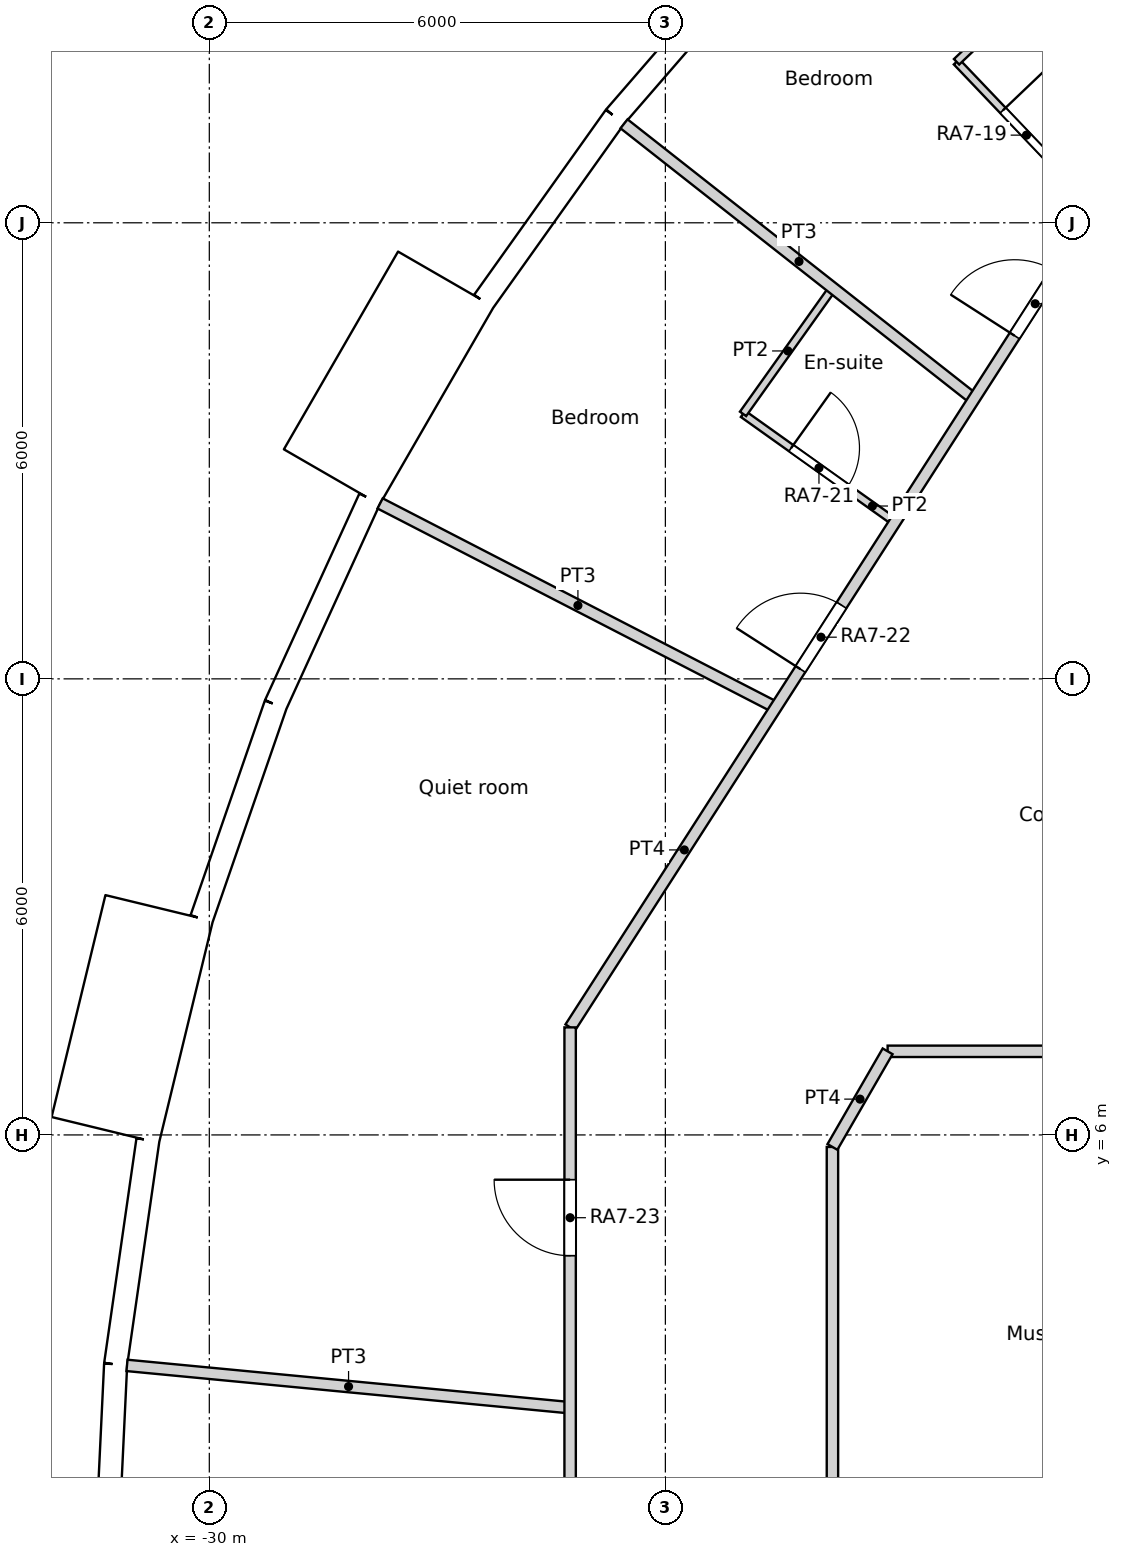
"""IFC4 building model, lengths in metres.
Left out: names, types, materials, properties, quantities, classifications, styles, units other than length and angle.
Written with IfcOpenShell. Run it as: python <this file> out.ifc"""

import sys

from ifc_helpers import new_model, si_unit, direction, frame, frame_2d, origin, origin_2d, place, context, subcontext, project, spatial, rectangle, circle, extrude, element, fill, save


model = new_model("IFC4")
c1 = context("Model", 3, precision=1e-05, world=origin(), true_north=direction((0.0, 1.0)))
c2 = subcontext(c1, "Body", "Model", "MODEL_VIEW")
j1 = project(units=[si_unit("LENGTHUNIT", "METRE"), si_unit("PLANEANGLEUNIT", "RADIAN")], contexts=[c1])
p1 = place(None, origin())
s1 = spatial("IfcSite", under=j1, at=p1, CompositionType="ELEMENT")
p2 = place(p1, origin())
s2 = spatial("IfcBuilding", under=s1, at=p2, CompositionType="ELEMENT")
p3 = place(p2, frame((0.0, 0.0, 93.0)))
s3 = spatial("IfcBuildingStorey", under=s2, at=p3, CompositionType="ELEMENT", Elevation=93.0)
for number, where, z_axis, x_axis in (
    (1, (-23.797, 18.715, 0.0), (0.0, 0.0, 1.0), (1.0, 0.0, 0.0)),
    (2, (-26.909, 13.873, 0.0), (0.0, 0.0, 1.0), (1.0, 0.0, 0.0)),
    (3, (-29.048, 8.529, 0.0), (0.0, 0.0, 1.0), (1.0, 0.0, 0.0)),
    (4, (-30.137, 2.878, 0.0), (0.0, 0.0, 1.0), (1.0, 0.0, 0.0)),
):
    element("IfcColumn", number, at=place(p3, frame(where, z_axis=z_axis, x_axis=x_axis)), inside=s3, PredefinedType="COLUMN", context=c2, shape_type="SweptSolid", body=[
        extrude(circle(Radius=0.6, at=origin_2d()), origin(), (0.0, 0.0, 1.0), 3.6),
    ])
for number, where, z_axis, x_axis in (
    (5, (-20.509, 13.489, 0.0), (0.0, 0.0, 1.0), (1.0, 0.0, 0.0)),
    (6, (-23.067, 8.396, 0.0), (0.0, 0.0, 1.0), (1.0, 0.0, 0.0)),
    (7, (-24.382, 2.85, 0.0), (0.0, 0.0, 1.0), (1.0, 0.0, 0.0)),
):
    element("IfcColumn", number, at=place(p3, frame(where, z_axis=z_axis, x_axis=x_axis)), inside=s3, PredefinedType="COLUMN", context=c2, shape_type="SweptSolid", body=[
        extrude(circle(Radius=0.65, at=origin_2d()), origin(), (0.0, 0.0, 1.0), 3.6),
    ])
p4 = place(p3, frame((-18.612, 2.805, 0.0), z_axis=(0.0, 0.0, 1.0), x_axis=(1.0, 0.0, 0.0)))
e8 = element("IfcColumn", 8, at=p4, inside=s3, PredefinedType="COLUMN", context=c2, shape_type="SweptSolid", body=[
    extrude(circle(Radius=0.7, at=origin_2d()), origin(), (0.0, 0.0, 1.0), 3.6),
])
p5 = place(p3, frame((-22.711, 21.646, 0.0), z_axis=(0.0, 0.0, 1.0), x_axis=(-0.654830712471, -0.755775587066, 0.0)))
e9 = element("IfcWall", 9, at=p5, inside=s3, PredefinedType="SOLIDWALL", context=c2, shape_type="SweptSolid", body=[
    extrude(rectangle(XDim=2.98, YDim=0.3, at=frame_2d((1.49, 0.0))), origin(), (0.0, 0.0, 1.0), 3.15),
])
p6 = place(p5, frame((1.49, 0.0, 1.55)))
e10 = element("IfcOpeningElement", 10, at=p6, cuts=e9, PredefinedType="OPENING", context=c2, shape_type="SweptSolid", body=[
    extrude(circle(Radius=0.9, at=origin_2d()), frame((0.0, 0.16, 0.0), z_axis=(0.0, -1.0, 0.0), x_axis=(1.0, 0.0, 0.0)), (0.0, 0.0, 1.0), 0.32),
])
p7 = place(p3, frame((-24.662, 19.394, 0.0), z_axis=(0.0, 0.0, 1.0), x_axis=(-0.580113774115, -0.814535456, 0.0)))
e11 = element("IfcWall", 11, at=p7, inside=s3, PredefinedType="SOLIDWALL", context=c2, shape_type="SweptSolid", body=[
    extrude(rectangle(XDim=2.98, YDim=0.3, at=frame_2d((1.49, 0.0))), origin(), (0.0, 0.0, 1.0), 3.15),
])
p8 = place(p7, frame((1.49, 0.0, 1.55)))
e12 = element("IfcOpeningElement", 12, at=p8, cuts=e11, PredefinedType="OPENING", context=c2, shape_type="SweptSolid", body=[
    extrude(circle(Radius=0.9, at=origin_2d()), frame((0.0, 0.16, 0.0), z_axis=(0.0, -1.0, 0.0), x_axis=(1.0, 0.0, 0.0)), (0.0, 0.0, 1.0), 0.32),
])
p9 = place(p3, frame((-26.888, 17.256, -0.45), z_axis=(0.0, 0.0, 1.0), x_axis=(-0.499990139034, -0.866031096941, 0.0)))
e13 = element("IfcWall", 13, at=p9, inside=s3, PredefinedType="ELEMENTEDWALL", context=c2, shape_type="SweptSolid", body=[
    extrude(rectangle(XDim=3.0, YDim=1.45, at=frame_2d((1.5, 0.0))), origin(), (0.0, 0.0, 1.0), 3.6),
])
p10 = place(p9, frame((1.5, 0.0, 2.0)))
e14 = element("IfcOpeningElement", 14, at=p10, cuts=e13, PredefinedType="OPENING", context=c2, shape_type="SweptSolid", body=[
    extrude(circle(Radius=0.9, at=origin_2d()), frame((0.0, 0.735, 0.0), z_axis=(0.0, -1.0, 0.0), x_axis=(1.0, 0.0, 0.0)), (0.0, 0.0, 1.0), 1.47),
])
p11 = place(p3, frame((-27.889, 14.371, 0.0), z_axis=(0.0, 0.0, 1.0), x_axis=(-0.415407317162, -0.909635509888, 0.0)))
e15 = element("IfcWall", 15, at=p11, inside=s3, PredefinedType="SOLIDWALL", context=c2, shape_type="SweptSolid", body=[
    extrude(rectangle(XDim=2.98, YDim=0.3, at=frame_2d((1.49, 0.0))), origin(), (0.0, 0.0, 1.0), 3.15),
])
p12 = place(p11, frame((1.49, 0.0, 1.55)))
e16 = element("IfcOpeningElement", 16, at=p12, cuts=e15, PredefinedType="OPENING", context=c2, shape_type="SweptSolid", body=[
    extrude(circle(Radius=0.9, at=origin_2d()), frame((0.0, 0.16, 0.0), z_axis=(0.0, -1.0, 0.0), x_axis=(1.0, 0.0, 0.0)), (0.0, 0.0, 1.0), 0.32),
])
p13 = place(p3, frame((-29.127, 11.661, 0.0), z_axis=(0.0, 0.0, 1.0), x_axis=(-0.327096492592, -0.944990944154, 0.0)))
e17 = element("IfcWall", 17, at=p13, inside=s3, PredefinedType="SOLIDWALL", context=c2, shape_type="SweptSolid", body=[
    extrude(rectangle(XDim=2.979, YDim=0.3, at=frame_2d((1.49, 0.0))), origin(), (0.0, 0.0, 1.0), 3.15),
])
p14 = place(p13, frame((1.49, 0.0, 1.55)))
e18 = element("IfcOpeningElement", 18, at=p14, cuts=e17, PredefinedType="OPENING", context=c2, shape_type="SweptSolid", body=[
    extrude(circle(Radius=0.9, at=origin_2d()), frame((0.0, 0.16, 0.0), z_axis=(0.0, -1.0, 0.0), x_axis=(1.0, 0.0, 0.0)), (0.0, 0.0, 1.0), 0.32),
])
p15 = place(p3, frame((-30.661, 8.982, -0.45), z_axis=(0.0, 0.0, 1.0), x_axis=(-0.235751415068, -0.971813392732, 0.0)))
e19 = element("IfcWall", 19, at=p15, inside=s3, PredefinedType="ELEMENTEDWALL", context=c2, shape_type="SweptSolid", body=[
    extrude(rectangle(XDim=3.0, YDim=1.45, at=frame_2d((1.5, 0.0))), origin(), (0.0, 0.0, 1.0), 3.6),
])
p16 = place(p15, frame((1.5, 0.0, 2.0)))
e20 = element("IfcOpeningElement", 20, at=p16, cuts=e19, PredefinedType="OPENING", context=c2, shape_type="SweptSolid", body=[
    extrude(circle(Radius=0.9, at=origin_2d()), frame((0.0, 0.735, 0.0), z_axis=(0.0, -1.0, 0.0), x_axis=(1.0, 0.0, 0.0)), (0.0, 0.0, 1.0), 1.47),
])
p17 = place(p3, frame((-30.808, 5.932, 0.0), z_axis=(0.0, 0.0, 1.0), x_axis=(-0.142327539111, -0.989819615693, 0.0)))
e21 = element("IfcWall", 21, at=p17, inside=s3, PredefinedType="SOLIDWALL", context=c2, shape_type="SweptSolid", body=[
    extrude(rectangle(XDim=2.979, YDim=0.3, at=frame_2d((1.49, 0.0))), origin(), (0.0, 0.0, 1.0), 3.15),
])
p18 = place(p17, frame((1.49, 0.0, 1.55)))
e22 = element("IfcOpeningElement", 22, at=p18, cuts=e21, PredefinedType="OPENING", context=c2, shape_type="SweptSolid", body=[
    extrude(circle(Radius=0.9, at=origin_2d()), frame((0.0, 0.16, 0.0), z_axis=(0.0, -1.0, 0.0), x_axis=(1.0, 0.0, 0.0)), (0.0, 0.0, 1.0), 0.32),
])
p19 = place(p3, frame((-31.232, 2.982, 0.0), z_axis=(0.0, 0.0, 1.0), x_axis=(-0.047522328113, -0.998870175914, 0.0)))
e23 = element("IfcWall", 23, at=p19, inside=s3, PredefinedType="SOLIDWALL", context=c2, shape_type="SweptSolid", body=[
    extrude(rectangle(XDim=2.98, YDim=0.3, at=frame_2d((1.49, 0.0))), origin(), (0.0, 0.0, 1.0), 3.15),
])
p20 = place(p19, frame((1.49, 0.0, 1.55)))
e24 = element("IfcOpeningElement", 24, at=p20, cuts=e23, PredefinedType="OPENING", context=c2, shape_type="SweptSolid", body=[
    extrude(circle(Radius=0.9, at=origin_2d()), frame((0.0, 0.16, 0.0), z_axis=(0.0, -1.0, 0.0), x_axis=(1.0, 0.0, 0.0)), (0.0, 0.0, 1.0), 0.32),
])
p21 = place(p3, frame((-21.076, 7.1, 0.0), z_axis=(0.0, 0.0, 1.0), x_axis=(1.0, 0.0, 0.0)))
e25 = element("IfcWall", 25, at=p21, inside=s3, PredefinedType="PARTITIONING", context=c2, shape_type="SweptSolid", body=[
    extrude(rectangle(XDim=5.276, YDim=0.15, at=frame_2d((2.638, 0.0))), origin(), (0.0, 0.0, 1.0), 3.15),
])
p22 = place(p3, frame((-21.802, 5.842, 0.0), z_axis=(0.0, 0.0, 1.0), x_axis=(0.499863102386, 0.866104427234, 0.0)))
e26 = element("IfcWall", 26, at=p22, inside=s3, PredefinedType="PARTITIONING", context=c2, shape_type="SweptSolid", body=[
    extrude(rectangle(XDim=1.453, YDim=0.15, at=frame_2d((0.726, 0.0))), origin(), (0.0, 0.0, 1.0), 3.15),
])
p23 = place(p3, frame((-21.802, -5.842, 0.0), z_axis=(0.0, 0.0, 1.0), x_axis=(0.0, 1.0, 0.0)))
e27 = element("IfcWall", 27, at=p23, inside=s3, PredefinedType="PARTITIONING", context=c2, shape_type="SweptSolid", body=[
    extrude(rectangle(XDim=11.684, YDim=0.15, at=frame_2d((5.842, 0.0))), origin(), (0.0, 0.0, 1.0), 3.15),
])
p24 = place(p3, frame((-25.251, 7.414, 0.0), z_axis=(0.0, 0.0, 1.0), x_axis=(0.540498462047, 0.84134500208, 0.0)))
e28 = element("IfcWall", 28, at=p24, inside=s3, PredefinedType="PARTITIONING", context=c2, shape_type="SweptSolid", body=[
    extrude(rectangle(XDim=12.811, YDim=0.15, at=frame_2d((6.405, 0.0))), origin(), (0.0, 0.0, 1.0), 3.15),
])
p25 = place(p24, frame((10.817, 0.0, 0.0)))
e29 = element("IfcOpeningElement", 29, at=p25, cuts=e28, PredefinedType="OPENING", context=c2, shape_type="SweptSolid", body=[
    extrude(rectangle(XDim=1.0, YDim=2.1, at=frame_2d((0.5, 1.05))), frame((0.0, 0.075, 0.0), z_axis=(0.0, -1.0, 0.0), x_axis=(1.0, 0.0, 0.0)), (0.0, 0.0, 1.0), 0.15),
])
p26 = place(p24, frame((5.603, 0.0, 0.0)))
e30 = element("IfcOpeningElement", 30, at=p26, cuts=e28, PredefinedType="OPENING", context=c2, shape_type="SweptSolid", body=[
    extrude(rectangle(XDim=1.0, YDim=2.1, at=frame_2d((0.5, 1.05))), frame((0.0, 0.075, 0.0), z_axis=(0.0, -1.0, 0.0), x_axis=(1.0, 0.0, 0.0)), (0.0, 0.0, 1.0), 0.15),
])
p27 = place(p3, frame((-25.253, -7.415, 0.0), z_axis=(0.0, 0.0, 1.0), x_axis=(0.0, 1.0, 0.0)))
e31 = element("IfcWall", 31, at=p27, inside=s3, PredefinedType="PARTITIONING", context=c2, shape_type="SweptSolid", body=[
    extrude(rectangle(XDim=14.83, YDim=0.15, at=frame_2d((7.415, 0.0))), origin(), (0.0, 0.0, 1.0), 3.15),
])
p28 = place(p27, frame((11.826, 0.0, 0.0)))
e32 = element("IfcOpeningElement", 32, at=p28, cuts=e31, PredefinedType="OPENING", context=c2, shape_type="SweptSolid", body=[
    extrude(rectangle(XDim=1.0, YDim=2.04, at=frame_2d((0.5, 1.02))), frame((0.0, 0.075, 0.0), z_axis=(0.0, -1.0, 0.0), x_axis=(1.0, 0.0, 0.0)), (0.0, 0.0, 1.0), 0.15),
])
p29 = place(p27, frame((5.465, 0.0, 0.0)))
e33 = element("IfcOpeningElement", 33, at=p29, cuts=e31, PredefinedType="OPENING", context=c2, shape_type="SweptSolid", body=[
    extrude(rectangle(XDim=1.0, YDim=2.04, at=frame_2d((0.5, 1.02))), frame((0.0, 0.075, 0.0), z_axis=(0.0, -1.0, 0.0), x_axis=(1.0, 0.0, 0.0)), (0.0, 0.0, 1.0), 0.15),
])
p30 = place(p3, frame((-20.448, 23.598, 0.0), z_axis=(0.0, 0.0, 1.0), x_axis=(0.654900226821, -0.755715351776, 0.0)))
e34 = element("IfcWall", 34, at=p30, inside=s3, PredefinedType="PARTITIONING", context=c2, shape_type="SweptSolid", body=[
    extrude(rectangle(XDim=4.906, YDim=0.15, at=frame_2d((2.453, 0.0))), origin(), (0.0, 0.0, 1.0), 3.15),
])
p31 = place(p3, frame((-20.169, 20.118, 0.0), z_axis=(0.0, 0.0, 1.0), x_axis=(0.723537557066, 0.690285016145, 0.0)))
e35 = element("IfcWall", 35, at=p31, inside=s3, PredefinedType="PARTITIONING", context=c2, shape_type="SweptSolid", body=[
    extrude(rectangle(XDim=2.071, YDim=0.1, at=frame_2d((1.035, 0.0))), origin(), (0.0, 0.0, 1.0), 3.15),
])
p32 = place(p3, frame((-20.169, 20.118, 0.0), z_axis=(0.0, 0.0, 1.0), x_axis=(0.690011756227, -0.723798159896, 0.0)))
e36 = element("IfcWall", 36, at=p32, inside=s3, PredefinedType="PARTITIONING", context=c2, shape_type="SweptSolid", body=[
    extrude(rectangle(XDim=2.667, YDim=0.1, at=frame_2d((1.333, 0.0))), origin(), (0.0, 0.0, 1.0), 3.15),
])
p33 = place(p32, frame((0.883, 0.0, 0.0)))
e37 = element("IfcOpeningElement", 37, at=p33, cuts=e36, PredefinedType="OPENING", context=c2, shape_type="SweptSolid", body=[
    extrude(rectangle(XDim=0.9, YDim=2.04, at=frame_2d((0.45, 1.02))), frame((0.0, 0.05, 0.0), z_axis=(0.0, -1.0, 0.0), x_axis=(1.0, 0.0, 0.0)), (0.0, 0.0, 1.0), 0.1),
])
p34 = place(p3, frame((-24.544, 19.302, 0.0), z_axis=(0.0, 0.0, 1.0), x_axis=(0.786034767432, -0.618182290581, 0.0)))
e38 = element("IfcWall", 38, at=p34, inside=s3, PredefinedType="PARTITIONING", context=c2, shape_type="SweptSolid", body=[
    extrude(rectangle(XDim=5.857, YDim=0.15, at=frame_2d((2.929, 0.0))), origin(), (0.0, 0.0, 1.0), 3.15),
])
p35 = place(p3, frame((-22.978, 15.486, 0.0), z_axis=(0.0, 0.0, 1.0), x_axis=(0.580283748447, 0.814414373208, 0.0)))
e39 = element("IfcWall", 39, at=p35, inside=s3, PredefinedType="PARTITIONING", context=c2, shape_type="SweptSolid", body=[
    extrude(rectangle(XDim=2.033, YDim=0.1, at=frame_2d((1.017, 0.0))), origin(), (0.0, 0.0, 1.0), 3.15),
])
p36 = place(p3, frame((-22.978, 15.486, 0.0), z_axis=(0.0, 0.0, 1.0), x_axis=(0.814519517834, -0.580136152181, 0.0)))
e40 = element("IfcWall", 40, at=p36, inside=s3, PredefinedType="PARTITIONING", context=c2, shape_type="SweptSolid", body=[
    extrude(rectangle(XDim=2.453, YDim=0.1, at=frame_2d((1.227, 0.0))), origin(), (0.0, 0.0, 1.0), 3.15),
])
p37 = place(p36, frame((0.776, 0.0, 0.0)))
e41 = element("IfcOpeningElement", 41, at=p37, cuts=e40, PredefinedType="OPENING", context=c2, shape_type="SweptSolid", body=[
    extrude(rectangle(XDim=0.9, YDim=2.04, at=frame_2d((0.45, 1.02))), frame((0.0, 0.05, 0.0), z_axis=(0.0, -1.0, 0.0), x_axis=(1.0, 0.0, 0.0)), (0.0, 0.0, 1.0), 0.1),
])
p38 = place(p3, frame((-27.753, 14.308, 0.0), z_axis=(0.0, 0.0, 1.0), x_axis=(0.88877955153, -0.45833493079, 0.0)))
e42 = element("IfcWall", 42, at=p38, inside=s3, PredefinedType="PARTITIONING", context=c2, shape_type="SweptSolid", body=[
    extrude(rectangle(XDim=5.856, YDim=0.15, at=frame_2d((2.928, 0.0))), origin(), (0.0, 0.0, 1.0), 3.15),
])
p39 = place(p3, frame((-31.083, 2.968, 0.0), z_axis=(0.0, 0.0, 1.0), x_axis=(0.995465070325, -0.095127775983, 0.0)))
e43 = element("IfcWall", 43, at=p39, inside=s3, PredefinedType="PARTITIONING", context=c2, shape_type="SweptSolid", body=[
    extrude(rectangle(XDim=5.857, YDim=0.15, at=frame_2d((2.928, 0.0))), origin(), (0.0, 0.0, 1.0), 3.15),
])
p40 = place(p6, origin())
e44 = element("IfcWindow", 44, at=p40, inside=s3, PartitioningType="SINGLE_PANEL", PredefinedType="WINDOW", context=c2, shape_type="SweptSolid", body=[
    extrude(circle(Radius=0.9, at=origin_2d()), frame((0.0, 0.12, 0.0), z_axis=(0.0, -1.0, 0.0), x_axis=(1.0, 0.0, 0.0)), (0.0, 0.0, 1.0), 0.1),
])
fill(e10, e44)
p41 = place(p8, origin())
e45 = element("IfcWindow", 45, at=p41, inside=s3, PartitioningType="SINGLE_PANEL", PredefinedType="WINDOW", context=c2, shape_type="SweptSolid", body=[
    extrude(circle(Radius=0.9, at=origin_2d()), frame((0.0, 0.12, 0.0), z_axis=(0.0, -1.0, 0.0), x_axis=(1.0, 0.0, 0.0)), (0.0, 0.0, 1.0), 0.1),
])
fill(e12, e45)
p42 = place(p10, origin())
e46 = element("IfcWindow", 46, at=p42, inside=s3, PartitioningType="SINGLE_PANEL", PredefinedType="WINDOW", context=c2, shape_type="SweptSolid", body=[
    extrude(circle(Radius=0.9, at=origin_2d()), frame((0.0, 0.695, 0.0), z_axis=(0.0, -1.0, 0.0), x_axis=(1.0, 0.0, 0.0)), (0.0, 0.0, 1.0), 0.1),
])
fill(e14, e46)
p43 = place(p12, origin())
e47 = element("IfcWindow", 47, at=p43, inside=s3, PartitioningType="SINGLE_PANEL", PredefinedType="WINDOW", context=c2, shape_type="SweptSolid", body=[
    extrude(circle(Radius=0.9, at=origin_2d()), frame((0.0, 0.12, 0.0), z_axis=(0.0, -1.0, 0.0), x_axis=(1.0, 0.0, 0.0)), (0.0, 0.0, 1.0), 0.1),
])
fill(e16, e47)
p44 = place(p14, origin())
e48 = element("IfcWindow", 48, at=p44, inside=s3, PartitioningType="SINGLE_PANEL", PredefinedType="WINDOW", context=c2, shape_type="SweptSolid", body=[
    extrude(circle(Radius=0.9, at=origin_2d()), frame((0.0, 0.12, 0.0), z_axis=(0.0, -1.0, 0.0), x_axis=(1.0, 0.0, 0.0)), (0.0, 0.0, 1.0), 0.1),
])
fill(e18, e48)
p45 = place(p16, origin())
e49 = element("IfcWindow", 49, at=p45, inside=s3, PartitioningType="SINGLE_PANEL", PredefinedType="WINDOW", context=c2, shape_type="SweptSolid", body=[
    extrude(circle(Radius=0.9, at=origin_2d()), frame((0.0, 0.695, 0.0), z_axis=(0.0, -1.0, 0.0), x_axis=(1.0, 0.0, 0.0)), (0.0, 0.0, 1.0), 0.1),
])
fill(e20, e49)
p46 = place(p18, origin())
e50 = element("IfcWindow", 50, at=p46, inside=s3, PartitioningType="SINGLE_PANEL", PredefinedType="WINDOW", context=c2, shape_type="SweptSolid", body=[
    extrude(circle(Radius=0.9, at=origin_2d()), frame((0.0, 0.12, 0.0), z_axis=(0.0, -1.0, 0.0), x_axis=(1.0, 0.0, 0.0)), (0.0, 0.0, 1.0), 0.1),
])
fill(e22, e50)
p47 = place(p20, origin())
e51 = element("IfcWindow", 51, at=p47, inside=s3, PartitioningType="SINGLE_PANEL", PredefinedType="WINDOW", context=c2, shape_type="SweptSolid", body=[
    extrude(circle(Radius=0.9, at=origin_2d()), frame((0.0, 0.12, 0.0), z_axis=(0.0, -1.0, 0.0), x_axis=(1.0, 0.0, 0.0)), (0.0, 0.0, 1.0), 0.1),
])
fill(e24, e51)
p48 = place(p33, origin())
e52 = element("IfcDoor", 52, at=p48, inside=s3, OperationType="SINGLE_SWING_LEFT", PredefinedType="DOOR", context=c2, shape_type="SweptSolid", body=[
    extrude(rectangle(XDim=0.9, YDim=2.04, at=frame_2d((0.45, 1.02))), frame((0.0, 0.025, 0.0), z_axis=(0.0, -1.0, 0.0), x_axis=(1.0, 0.0, 0.0)), (0.0, 0.0, 1.0), 0.05),
])
fill(e37, e52)
p49 = place(p25, origin())
e53 = element("IfcDoor", 53, at=p49, inside=s3, OperationType="SINGLE_SWING_LEFT", PredefinedType="DOOR", context=c2, shape_type="SweptSolid", body=[
    extrude(rectangle(XDim=1.0, YDim=2.1, at=frame_2d((0.5, 1.05))), frame((0.0, 0.025, 0.0), z_axis=(0.0, -1.0, 0.0), x_axis=(1.0, 0.0, 0.0)), (0.0, 0.0, 1.0), 0.05),
])
fill(e29, e53)
p50 = place(p37, origin())
e54 = element("IfcDoor", 54, at=p50, inside=s3, OperationType="SINGLE_SWING_LEFT", PredefinedType="DOOR", context=c2, shape_type="SweptSolid", body=[
    extrude(rectangle(XDim=0.9, YDim=2.04, at=frame_2d((0.45, 1.02))), frame((0.0, 0.025, 0.0), z_axis=(0.0, -1.0, 0.0), x_axis=(1.0, 0.0, 0.0)), (0.0, 0.0, 1.0), 0.05),
])
fill(e41, e54)
p51 = place(p26, origin())
e55 = element("IfcDoor", 55, at=p51, inside=s3, OperationType="SINGLE_SWING_LEFT", PredefinedType="DOOR", context=c2, shape_type="SweptSolid", body=[
    extrude(rectangle(XDim=1.0, YDim=2.1, at=frame_2d((0.5, 1.05))), frame((0.0, 0.025, 0.0), z_axis=(0.0, -1.0, 0.0), x_axis=(1.0, 0.0, 0.0)), (0.0, 0.0, 1.0), 0.05),
])
fill(e30, e55)
p52 = place(p28, origin())
e56 = element("IfcDoor", 56, at=p52, inside=s3, OperationType="SINGLE_SWING_RIGHT", PredefinedType="DOOR", context=c2, shape_type="SweptSolid", body=[
    extrude(rectangle(XDim=1.0, YDim=2.04, at=frame_2d((0.5, 1.02))), frame((0.0, 0.025, 0.0), z_axis=(0.0, -1.0, 0.0), x_axis=(1.0, 0.0, 0.0)), (0.0, 0.0, 1.0), 0.05),
])
fill(e32, e56)
save(model, sys.argv[1])
